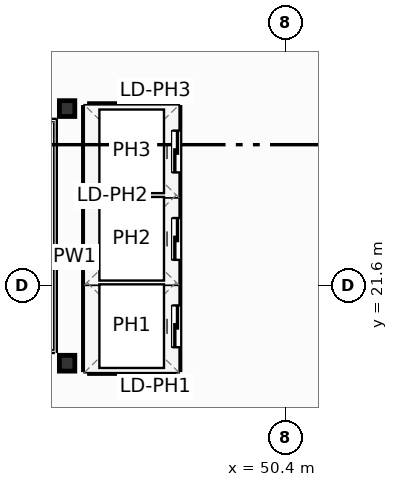
"""IFC4 building model, lengths in metres.
Left out: names, types, materials, properties, quantities, classifications, styles, units other than length and angle.
Written with IfcOpenShell. Run it as: python <this file> out.ifc"""

import sys

from ifc_helpers import new_model, si_unit, direction, frame, frame_2d, origin, origin_2d, place, context, subcontext, project, spatial, rectangle, i_section, extrude, element, fill, save


model = new_model("IFC4")
c1 = context("Model", 3, precision=1e-05, world=origin(), true_north=direction((0.0, 1.0)))
c2 = subcontext(c1, "Body", "Model", "MODEL_VIEW")
j1 = project(units=[si_unit("LENGTHUNIT", "METRE"), si_unit("PLANEANGLEUNIT", "RADIAN")], contexts=[c1])
p1 = place(None, origin())
s1 = spatial("IfcSite", under=j1, at=p1, CompositionType="ELEMENT")
p2 = place(p1, origin())
s2 = spatial("IfcBuilding", under=s1, at=p2, CompositionType="ELEMENT")
p3 = place(p2, frame((0.0, 0.0, 261.9)))
s3 = spatial("IfcBuildingStorey", under=s2, at=p3, CompositionType="ELEMENT", Elevation=261.9)
for number, where, z_axis, x_axis in (
    (1, (44.65, 19.55, 0.0), (0.0, 0.0, 1.0), (1.0, 0.0, 0.0)),
    (2, (44.65, 26.25, 0.0), (0.0, 0.0, 1.0), (1.0, 0.0, 0.0)),
):
    element("IfcColumn", number, at=place(p3, frame(where, z_axis=z_axis, x_axis=x_axis)), inside=s3, PredefinedType="COLUMN", context=c2, shape_type="SweptSolid", body=[
        extrude(i_section(OverallWidth=0.406, OverallDepth=0.416, WebThickness=0.03, FlangeThickness=0.048, FilletRadius=0.025, at=origin_2d()), origin(), (0.0, 0.0, 1.0), 3.7),
    ])
for number, where, z_axis, x_axis in (
    (3, (45.24, 21.675, 0.0), (0.0, 0.0, 1.0), (1.0, 0.0, 0.0)),
    (4, (45.24, 23.975, 0.0), (0.0, 0.0, 1.0), (1.0, 0.0, 0.0)),
):
    element("IfcWall", number, at=place(p3, frame(where, z_axis=z_axis, x_axis=x_axis)), inside=s3, PredefinedType="PARTITIONING", context=c2, shape_type="SweptSolid", body=[
        extrude(rectangle(XDim=2.22, YDim=0.2, at=frame_2d((1.11, 0.0))), origin(), (0.0, 0.0, 1.0), 3.45),
    ])
p4 = place(p3, frame((45.24, 19.38, 0.0), z_axis=(0.0, 0.0, 1.0), x_axis=(1.0, 0.0, 0.0)))
e5 = element("IfcWall", 5, at=p4, inside=s3, PredefinedType="PARTITIONING", context=c2, shape_type="SweptSolid", body=[
    extrude(rectangle(XDim=2.22, YDim=0.2, at=frame_2d((1.11, 0.0))), origin(), (0.0, 0.0, 1.0), 2.662),
])
p5 = place(p3, frame((45.24, 26.28, 0.0), z_axis=(0.0, 0.0, 1.0), x_axis=(1.0, 0.0, 0.0)))
e6 = element("IfcWall", 6, at=p5, inside=s3, PredefinedType="PARTITIONING", context=c2, shape_type="SweptSolid", body=[
    extrude(rectangle(XDim=2.22, YDim=0.2, at=frame_2d((1.11, 0.0))), origin(), (0.0, 0.0, 1.0), 3.45),
])
p6 = place(p3, frame((45.18, 19.38, 0.0), z_axis=(0.0, 0.0, 1.0), x_axis=(0.0, 1.0, 0.0)))
e7 = element("IfcWall", 7, at=p6, inside=s3, PredefinedType="PARTITIONING", context=c2, shape_type="SweptSolid", body=[
    extrude(rectangle(XDim=6.9, YDim=0.2, at=frame_2d((3.45, 0.0))), origin(), (0.0, 0.0, 1.0), 3.45),
])
p7 = place(p3, frame((47.52, 19.38, 0.0), z_axis=(0.0, 0.0, 1.0), x_axis=(0.0, 1.0, 0.0)))
e8 = element("IfcWall", 8, at=p7, inside=s3, PredefinedType="PARTITIONING", context=c2, shape_type="SweptSolid", body=[
    extrude(rectangle(XDim=6.9, YDim=0.2, at=frame_2d((3.45, 0.0))), origin(), (0.0, 0.0, 1.0), 3.45),
])
p8 = place(p7, frame((0.59, 0.0, 0.0)))
e9 = element("IfcOpeningElement", 9, at=p8, cuts=e8, PredefinedType="OPENING", context=c2, shape_type="SweptSolid", body=[
    extrude(rectangle(XDim=1.1, YDim=2.15, at=frame_2d((0.55, 1.075))), frame((0.0, 0.11, 0.0), z_axis=(0.0, -1.0, 0.0), x_axis=(1.0, 0.0, 0.0)), (0.0, 0.0, 1.0), 0.22),
])
p9 = place(p7, frame((2.89, 0.0, 0.0)))
e10 = element("IfcOpeningElement", 10, at=p9, cuts=e8, PredefinedType="OPENING", context=c2, shape_type="SweptSolid", body=[
    extrude(rectangle(XDim=1.1, YDim=2.15, at=frame_2d((0.55, 1.075))), frame((0.0, 0.11, 0.0), z_axis=(0.0, -1.0, 0.0), x_axis=(1.0, 0.0, 0.0)), (0.0, 0.0, 1.0), 0.22),
])
p10 = place(p7, frame((5.19, 0.0, 0.0)))
e11 = element("IfcOpeningElement", 11, at=p10, cuts=e8, PredefinedType="OPENING", context=c2, shape_type="SweptSolid", body=[
    extrude(rectangle(XDim=1.1, YDim=2.15, at=frame_2d((0.55, 1.075))), frame((0.0, 0.11, 0.0), z_axis=(0.0, -1.0, 0.0), x_axis=(1.0, 0.0, 0.0)), (0.0, 0.0, 1.0), 0.22),
])
p11 = place(p8, origin())
e12 = element("IfcDoor", 12, at=p11, inside=s3, OperationType="SLIDING_TO_LEFT", PredefinedType="DOOR", context=c2, shape_type="SweptSolid", body=[
    extrude(rectangle(XDim=1.1, YDim=2.15, at=frame_2d((0.55, 1.075))), frame((0.0, 0.025, 0.0), z_axis=(0.0, -1.0, 0.0), x_axis=(1.0, 0.0, 0.0)), (0.0, 0.0, 1.0), 0.05),
])
fill(e9, e12)
p12 = place(p9, origin())
e13 = element("IfcDoor", 13, at=p12, inside=s3, OperationType="SLIDING_TO_LEFT", PredefinedType="DOOR", context=c2, shape_type="SweptSolid", body=[
    extrude(rectangle(XDim=1.1, YDim=2.15, at=frame_2d((0.55, 1.075))), frame((0.0, 0.025, 0.0), z_axis=(0.0, -1.0, 0.0), x_axis=(1.0, 0.0, 0.0)), (0.0, 0.0, 1.0), 0.05),
])
fill(e10, e13)
p13 = place(p10, origin())
e14 = element("IfcDoor", 14, at=p13, inside=s3, OperationType="SLIDING_TO_LEFT", PredefinedType="DOOR", context=c2, shape_type="SweptSolid", body=[
    extrude(rectangle(XDim=1.1, YDim=2.15, at=frame_2d((0.55, 1.075))), frame((0.0, 0.025, 0.0), z_axis=(0.0, -1.0, 0.0), x_axis=(1.0, 0.0, 0.0)), (0.0, 0.0, 1.0), 0.05),
])
fill(e11, e14)
save(model, sys.argv[1])
